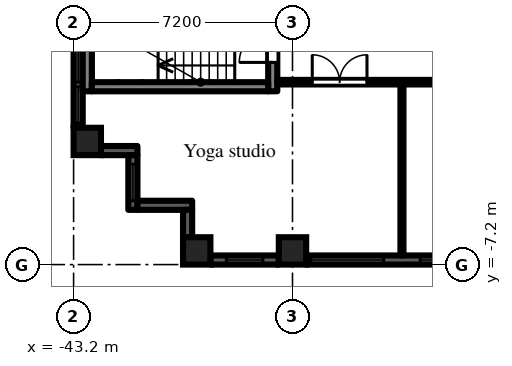
"""IFC4 building model, lengths in metres.
Left out: names, types, materials, properties, quantities, classifications, styles, units other than length and angle.
Written with IfcOpenShell. Run it as: python <this file> out.ifc"""

import sys

from ifc_helpers import new_model, si_unit, direction, frame, frame_2d, origin, origin_2d, place, context, subcontext, project, spatial, rectangle, extrude, element, fill, save


model = new_model("IFC4")
c1 = context("Model", 3, precision=1e-05, world=origin(), true_north=direction((0.0, 1.0)))
c2 = subcontext(c1, "Body", "Model", "MODEL_VIEW")
j1 = project(units=[si_unit("LENGTHUNIT", "METRE"), si_unit("PLANEANGLEUNIT", "RADIAN")], contexts=[c1])
p1 = place(None, origin())
s1 = spatial("IfcSite", under=j1, at=p1, CompositionType="ELEMENT")
p2 = place(p1, origin())
s2 = spatial("IfcBuilding", under=s1, at=p2, CompositionType="ELEMENT")
p3 = place(p2, frame((0.0, 0.0, 20.7)))
s3 = spatial("IfcBuildingStorey", under=s2, at=p3, CompositionType="ELEMENT", Elevation=20.7)
for number, where, z_axis, x_axis in (
    (1, (-42.75, -3.15, 0.0), (0.0, 0.0, 1.0), (1.0, 0.0, 0.0)),
    (2, (-39.15, -6.75, 0.0), (0.0, 0.0, 1.0), (1.0, 0.0, 0.0)),
    (3, (-36.0, -6.75, 0.0), (0.0, 0.0, 1.0), (1.0, 0.0, 0.0)),
):
    element("IfcColumn", number, at=place(p3, frame(where, z_axis=z_axis, x_axis=x_axis)), inside=s3, PredefinedType="COLUMN", context=c2, shape_type="SweptSolid", body=[
        extrude(rectangle(XDim=0.9, YDim=0.9, at=origin_2d()), origin(), (0.0, 0.0, 1.0), 3.0),
    ])
p4 = place(p3, frame((-43.05, 2.7, 0.0), z_axis=(0.0, 0.0, 1.0), x_axis=(0.0, -1.0, 0.0)))
e4 = element("IfcWall", 4, at=p4, inside=s3, PredefinedType="SOLIDWALL", context=c2, shape_type="SweptSolid", body=[
    extrude(rectangle(XDim=5.4, YDim=0.3, at=frame_2d((2.7, 0.0))), origin(), (0.0, 0.0, 1.0), 2.1),
])
p5 = place(p4, frame((1.5, 0.0, 0.2)))
e5 = element("IfcOpeningElement", 5, at=p5, cuts=e4, PredefinedType="OPENING", context=c2, shape_type="SweptSolid", body=[
    extrude(rectangle(XDim=2.4, YDim=1.85, at=frame_2d((1.2, 0.925))), frame((0.0, 0.16, 0.0), z_axis=(0.0, -1.0, 0.0), x_axis=(1.0, 0.0, 0.0)), (0.0, 0.0, 1.0), 0.32),
])
p6 = place(p4, frame((4.05, 0.0, 0.2)))
e6 = element("IfcOpeningElement", 6, at=p6, cuts=e4, PredefinedType="OPENING", context=c2, shape_type="SweptSolid", body=[
    extrude(rectangle(XDim=1.2, YDim=1.85, at=frame_2d((0.6, 0.925))), frame((0.0, 0.16, 0.0), z_axis=(0.0, -1.0, 0.0), x_axis=(1.0, 0.0, 0.0)), (0.0, 0.0, 1.0), 0.32),
])
p7 = place(p3, frame((-42.3, -3.45, 0.0), z_axis=(0.0, 0.0, 1.0), x_axis=(1.0, 0.0, 0.0)))
e7 = element("IfcWall", 7, at=p7, inside=s3, PredefinedType="SOLIDWALL", context=c2, shape_type="SweptSolid", body=[
    extrude(rectangle(XDim=1.2, YDim=0.3, at=frame_2d((0.6, 0.0))), origin(), (0.0, 0.0, 1.0), 2.575),
])
p8 = place(p3, frame((-41.25, -3.6, 0.0), z_axis=(0.0, 0.0, 1.0), x_axis=(0.0, -1.0, 0.0)))
e8 = element("IfcWall", 8, at=p8, inside=s3, PredefinedType="SOLIDWALL", context=c2, shape_type="SweptSolid", body=[
    extrude(rectangle(XDim=1.8, YDim=0.3, at=frame_2d((0.9, 0.0))), origin(), (0.0, 0.0, 1.0), 2.575),
])
p9 = place(p8, frame((0.3, 0.0, 0.2)))
e9 = element("IfcOpeningElement", 9, at=p9, cuts=e8, PredefinedType="OPENING", context=c2, shape_type="SweptSolid", body=[
    extrude(rectangle(XDim=1.2, YDim=1.85, at=frame_2d((0.6, 0.925))), frame((0.0, 0.16, 0.0), z_axis=(0.0, -1.0, 0.0), x_axis=(1.0, 0.0, 0.0)), (0.0, 0.0, 1.0), 0.32),
])
p10 = place(p3, frame((-41.1, -5.25, 0.0), z_axis=(0.0, 0.0, 1.0), x_axis=(1.0, 0.0, 0.0)))
e10 = element("IfcWall", 10, at=p10, inside=s3, PredefinedType="SOLIDWALL", context=c2, shape_type="SweptSolid", body=[
    extrude(rectangle(XDim=1.8, YDim=0.3, at=frame_2d((0.9, 0.0))), origin(), (0.0, 0.0, 1.0), 2.575),
])
p11 = place(p3, frame((-39.45, -5.4, 0.0), z_axis=(0.0, 0.0, 1.0), x_axis=(0.0, -1.0, 0.0)))
e11 = element("IfcWall", 11, at=p11, inside=s3, PredefinedType="SOLIDWALL", context=c2, shape_type="SweptSolid", body=[
    extrude(rectangle(XDim=0.9, YDim=0.3, at=frame_2d((0.45, 0.0))), origin(), (0.0, 0.0, 1.0), 2.575),
])
p12 = place(p3, frame((-38.7, -7.05, 0.0), z_axis=(0.0, 0.0, 1.0), x_axis=(1.0, 0.0, 0.0)))
e12 = element("IfcWall", 12, at=p12, inside=s3, PredefinedType="SOLIDWALL", context=c2, shape_type="SweptSolid", body=[
    extrude(rectangle(XDim=2.25, YDim=0.3, at=frame_2d((1.125, 0.0))), origin(), (0.0, 0.0, 1.0), 2.1),
])
p13 = place(p12, frame((0.525, 0.0, 0.2)))
e13 = element("IfcOpeningElement", 13, at=p13, cuts=e12, PredefinedType="OPENING", context=c2, shape_type="SweptSolid", body=[
    extrude(rectangle(XDim=1.2, YDim=1.85, at=frame_2d((0.6, 0.925))), frame((0.0, 0.16, 0.0), z_axis=(0.0, -1.0, 0.0), x_axis=(1.0, 0.0, 0.0)), (0.0, 0.0, 1.0), 0.32),
])
p14 = place(p3, frame((-35.55, -7.05, 0.0), z_axis=(0.0, 0.0, 1.0), x_axis=(1.0, 0.0, 0.0)))
e14 = element("IfcWall", 14, at=p14, inside=s3, PredefinedType="SOLIDWALL", context=c2, shape_type="SweptSolid", body=[
    extrude(rectangle(XDim=6.3, YDim=0.3, at=frame_2d((3.15, 0.0))), origin(), (0.0, 0.0, 1.0), 2.1),
])
p15 = place(p14, frame((0.15, 0.0, 0.2)))
e15 = element("IfcOpeningElement", 15, at=p15, cuts=e14, PredefinedType="OPENING", context=c2, shape_type="SweptSolid", body=[
    extrude(rectangle(XDim=2.4, YDim=1.85, at=frame_2d((1.2, 0.925))), frame((0.0, 0.16, 0.0), z_axis=(0.0, -1.0, 0.0), x_axis=(1.0, 0.0, 0.0)), (0.0, 0.0, 1.0), 0.32),
])
p16 = place(p14, frame((3.75, 0.0, 0.2)))
e16 = element("IfcOpeningElement", 16, at=p16, cuts=e14, PredefinedType="OPENING", context=c2, shape_type="SweptSolid", body=[
    extrude(rectangle(XDim=2.4, YDim=1.85, at=frame_2d((1.2, 0.925))), frame((0.0, 0.16, 0.0), z_axis=(0.0, -1.0, 0.0), x_axis=(1.0, 0.0, 0.0)), (0.0, 0.0, 1.0), 0.32),
])
p17 = place(p3, frame((-36.65, -1.5, 0.0), z_axis=(0.0, 0.0, 1.0), x_axis=(0.0, 1.0, 0.0)))
e17 = element("IfcWall", 17, at=p17, inside=s3, PredefinedType="SHEAR", context=c2, shape_type="SweptSolid", body=[
    extrude(rectangle(XDim=3.0, YDim=0.3, at=frame_2d((1.5, 0.0))), origin(), (0.0, 0.0, 1.0), 2.575),
])
p18 = place(p17, frame((0.95, 0.0, 0.0)))
e18 = element("IfcOpeningElement", 18, at=p18, cuts=e17, PredefinedType="OPENING", context=c2, shape_type="SweptSolid", body=[
    extrude(rectangle(XDim=1.1, YDim=2.1, at=frame_2d((0.55, 1.05))), frame((0.0, 0.16, 0.0), z_axis=(0.0, -1.0, 0.0), x_axis=(1.0, 0.0, 0.0)), (0.0, 0.0, 1.0), 0.32),
])
p19 = place(p3, frame((-42.75, -1.5, 0.0), z_axis=(0.0, 0.0, 1.0), x_axis=(0.0, 1.0, 0.0)))
e19 = element("IfcWall", 19, at=p19, inside=s3, PredefinedType="SHEAR", context=c2, shape_type="SweptSolid", body=[
    extrude(rectangle(XDim=3.0, YDim=0.3, at=frame_2d((1.5, 0.0))), origin(), (0.0, 0.0, 1.0), 2.575),
])
p20 = place(p3, frame((-36.8, -1.35, 0.0), z_axis=(0.0, 0.0, 1.0), x_axis=(-1.0, 0.0, 0.0)))
e20 = element("IfcWall", 20, at=p20, inside=s3, PredefinedType="SHEAR", context=c2, shape_type="SweptSolid", body=[
    extrude(rectangle(XDim=5.8, YDim=0.3, at=frame_2d((2.9, 0.0))), origin(), (0.0, 0.0, 1.0), 2.575),
])
p21 = place(p3, frame((-36.5, -1.2, 0.0), z_axis=(0.0, 0.0, 1.0), x_axis=(1.0, 0.0, 0.0)))
e21 = element("IfcWall", 21, at=p21, inside=s3, PredefinedType="PARTITIONING", context=c2, shape_type="SweptSolid", body=[
    extrude(rectangle(XDim=14.9, YDim=0.15, at=frame_2d((7.45, 0.0))), origin(), (0.0, 0.0, 1.0), 2.575),
])
p22 = place(p21, frame((13.55, 0.0, 0.0)))
e22 = element("IfcOpeningElement", 22, at=p22, cuts=e21, PredefinedType="OPENING", context=c2, shape_type="SweptSolid", body=[
    extrude(rectangle(XDim=0.9, YDim=2.1, at=frame_2d((0.45, 1.05))), frame((0.0, 0.085, 0.0), z_axis=(0.0, -1.0, 0.0), x_axis=(1.0, 0.0, 0.0)), (0.0, 0.0, 1.0), 0.17),
])
p23 = place(p21, frame((11.75, 0.0, 0.0)))
e23 = element("IfcOpeningElement", 23, at=p23, cuts=e21, PredefinedType="OPENING", context=c2, shape_type="SweptSolid", body=[
    extrude(rectangle(XDim=0.9, YDim=2.1, at=frame_2d((0.45, 1.05))), frame((0.0, 0.085, 0.0), z_axis=(0.0, -1.0, 0.0), x_axis=(1.0, 0.0, 0.0)), (0.0, 0.0, 1.0), 0.17),
])
p24 = place(p21, frame((9.05, 0.0, 0.0)))
e24 = element("IfcOpeningElement", 24, at=p24, cuts=e21, PredefinedType="OPENING", context=c2, shape_type="SweptSolid", body=[
    extrude(rectangle(XDim=0.9, YDim=2.1, at=frame_2d((0.45, 1.05))), frame((0.0, 0.085, 0.0), z_axis=(0.0, -1.0, 0.0), x_axis=(1.0, 0.0, 0.0)), (0.0, 0.0, 1.0), 0.17),
])
p25 = place(p21, frame((5.45, 0.0, 0.0)))
e25 = element("IfcOpeningElement", 25, at=p25, cuts=e21, PredefinedType="OPENING", context=c2, shape_type="SweptSolid", body=[
    extrude(rectangle(XDim=0.9, YDim=2.1, at=frame_2d((0.45, 1.05))), frame((0.0, 0.085, 0.0), z_axis=(0.0, -1.0, 0.0), x_axis=(1.0, 0.0, 0.0)), (0.0, 0.0, 1.0), 0.17),
])
p26 = place(p21, frame((1.15, 0.0, 0.0)))
e26 = element("IfcOpeningElement", 26, at=p26, cuts=e21, PredefinedType="OPENING", context=c2, shape_type="SweptSolid", body=[
    extrude(rectangle(XDim=1.8, YDim=2.1, at=frame_2d((0.9, 1.05))), frame((0.0, 0.085, 0.0), z_axis=(0.0, -1.0, 0.0), x_axis=(1.0, 0.0, 0.0)), (0.0, 0.0, 1.0), 0.17),
])
p27 = place(p3, frame((-32.4, -6.9, 0.0), z_axis=(0.0, 0.0, 1.0), x_axis=(0.0, 1.0, 0.0)))
e27 = element("IfcWall", 27, at=p27, inside=s3, PredefinedType="PARTITIONING", context=c2, shape_type="SweptSolid", body=[
    extrude(rectangle(XDim=5.625, YDim=0.1, at=frame_2d((2.812, 0.0))), origin(), (0.0, 0.0, 1.0), 2.575),
])
p28 = place(p5, origin())
e28 = element("IfcWindow", 28, at=p28, inside=s3, PartitioningType="SINGLE_PANEL", PredefinedType="WINDOW", context=c2, shape_type="SweptSolid", body=[
    extrude(rectangle(XDim=2.4, YDim=1.85, at=frame_2d((1.2, 0.925))), frame((0.0, 0.03, 0.0), z_axis=(0.0, -1.0, 0.0), x_axis=(1.0, 0.0, 0.0)), (0.0, 0.0, 1.0), 0.06),
])
fill(e5, e28)
p29 = place(p6, origin())
e29 = element("IfcWindow", 29, at=p29, inside=s3, PartitioningType="SINGLE_PANEL", PredefinedType="WINDOW", context=c2, shape_type="SweptSolid", body=[
    extrude(rectangle(XDim=1.2, YDim=1.85, at=frame_2d((0.6, 0.925))), frame((0.0, 0.03, 0.0), z_axis=(0.0, -1.0, 0.0), x_axis=(1.0, 0.0, 0.0)), (0.0, 0.0, 1.0), 0.06),
])
fill(e6, e29)
p30 = place(p9, origin())
e30 = element("IfcWindow", 30, at=p30, inside=s3, PartitioningType="SINGLE_PANEL", PredefinedType="WINDOW", context=c2, shape_type="SweptSolid", body=[
    extrude(rectangle(XDim=1.2, YDim=1.85, at=frame_2d((0.6, 0.925))), frame((0.0, 0.03, 0.0), z_axis=(0.0, -1.0, 0.0), x_axis=(1.0, 0.0, 0.0)), (0.0, 0.0, 1.0), 0.06),
])
fill(e9, e30)
p31 = place(p13, origin())
e31 = element("IfcWindow", 31, at=p31, inside=s3, PartitioningType="SINGLE_PANEL", PredefinedType="WINDOW", context=c2, shape_type="SweptSolid", body=[
    extrude(rectangle(XDim=1.2, YDim=1.85, at=frame_2d((0.6, 0.925))), frame((0.0, 0.03, 0.0), z_axis=(0.0, -1.0, 0.0), x_axis=(1.0, 0.0, 0.0)), (0.0, 0.0, 1.0), 0.06),
])
fill(e13, e31)
p32 = place(p15, origin())
e32 = element("IfcWindow", 32, at=p32, inside=s3, PartitioningType="SINGLE_PANEL", PredefinedType="WINDOW", context=c2, shape_type="SweptSolid", body=[
    extrude(rectangle(XDim=2.4, YDim=1.85, at=frame_2d((1.2, 0.925))), frame((0.0, 0.03, 0.0), z_axis=(0.0, -1.0, 0.0), x_axis=(1.0, 0.0, 0.0)), (0.0, 0.0, 1.0), 0.06),
])
fill(e15, e32)
p33 = place(p16, origin())
e33 = element("IfcWindow", 33, at=p33, inside=s3, PartitioningType="SINGLE_PANEL", PredefinedType="WINDOW", context=c2, shape_type="SweptSolid", body=[
    extrude(rectangle(XDim=2.4, YDim=1.85, at=frame_2d((1.2, 0.925))), frame((0.0, 0.03, 0.0), z_axis=(0.0, -1.0, 0.0), x_axis=(1.0, 0.0, 0.0)), (0.0, 0.0, 1.0), 0.06),
])
fill(e16, e33)
p34 = place(p18, origin())
e34 = element("IfcDoor", 34, at=p34, inside=s3, OperationType="SINGLE_SWING_LEFT", PredefinedType="DOOR", context=c2, shape_type="SweptSolid", body=[
    extrude(rectangle(XDim=1.1, YDim=2.1, at=frame_2d((0.55, 1.05))), frame((0.0, 0.025, 0.0), z_axis=(0.0, -1.0, 0.0), x_axis=(1.0, 0.0, 0.0)), (0.0, 0.0, 1.0), 0.05),
])
fill(e18, e34)
p35 = place(p26, origin())
e35 = element("IfcDoor", 35, at=p35, inside=s3, OperationType="DOUBLE_DOOR_DOUBLE_SWING", PredefinedType="DOOR", context=c2, shape_type="SweptSolid", body=[
    extrude(rectangle(XDim=1.8, YDim=2.1, at=frame_2d((0.9, 1.05))), frame((0.0, 0.025, 0.0), z_axis=(0.0, -1.0, 0.0), x_axis=(1.0, 0.0, 0.0)), (0.0, 0.0, 1.0), 0.05),
])
fill(e26, e35)
save(model, sys.argv[1])
